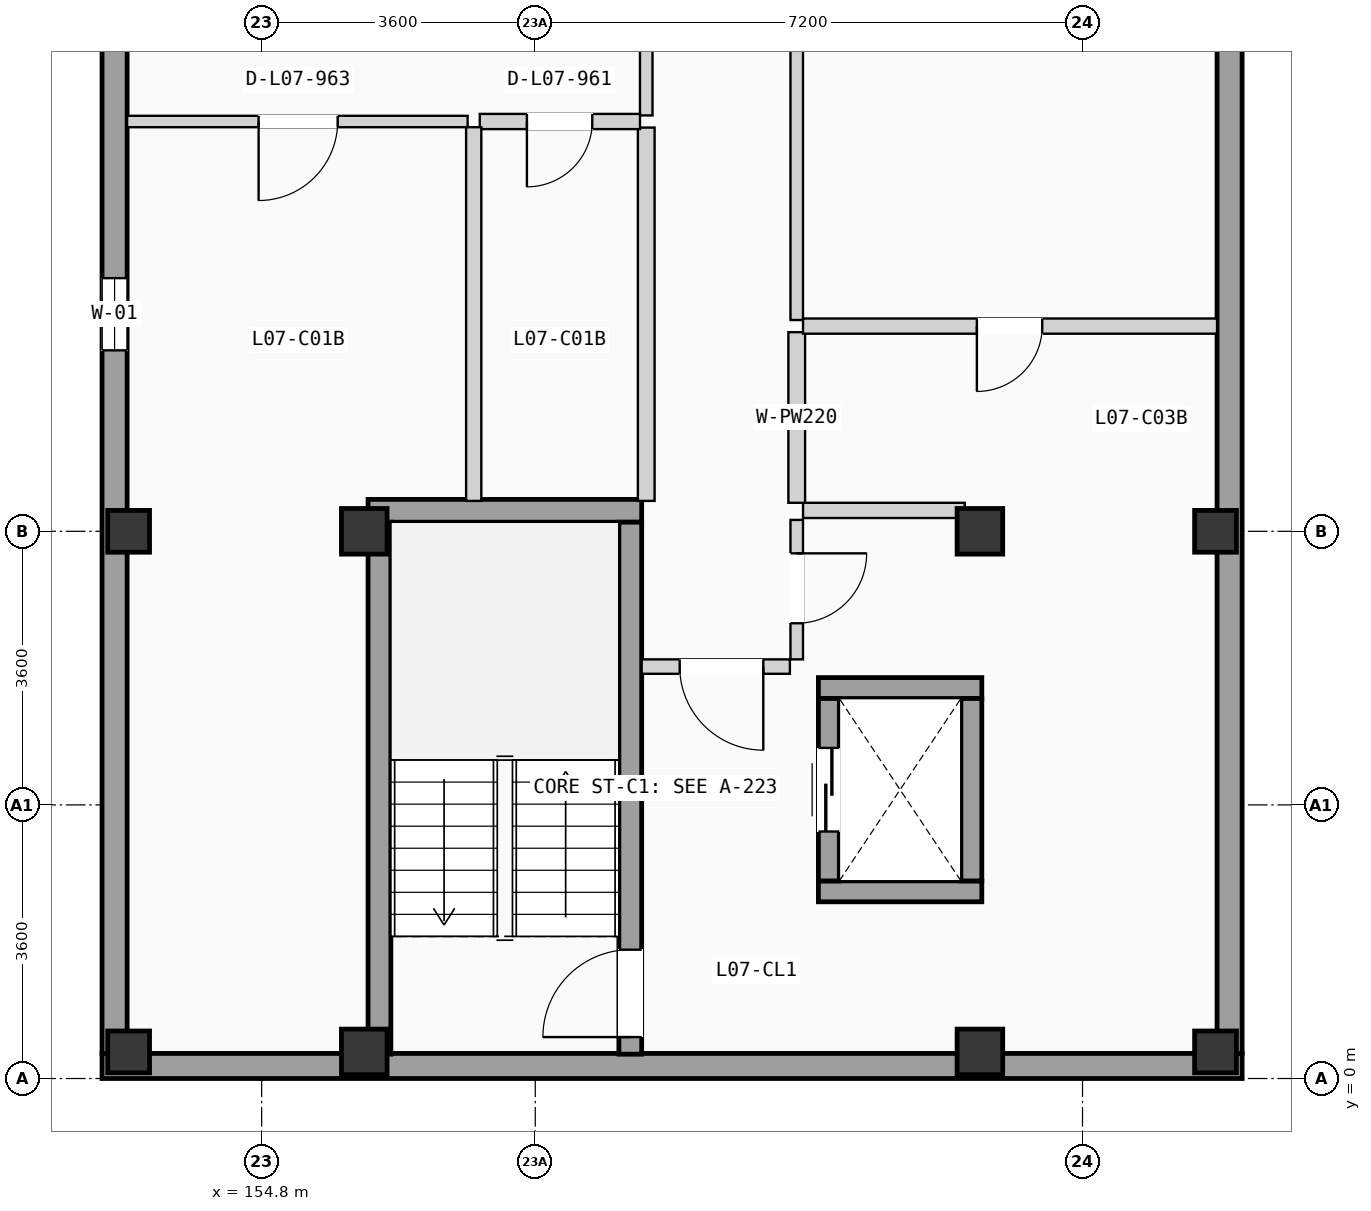
"""IFC4 building model, lengths in metres.
Left out: names, types, materials, properties, quantities, classifications, styles, units other than length and angle.
Written with IfcOpenShell. Run it as: python <this file> out.ifc"""

import sys

from ifc_helpers import new_model, si_unit, direction, frame, frame_2d, origin, origin_2d, place, context, subcontext, project, spatial, rectangle, extrude, element, fill, save


model = new_model("IFC4")
c1 = context("Model", 3, precision=1e-05, world=origin(), true_north=direction((0.0, 1.0)))
c2 = subcontext(c1, "Body", "Model", "MODEL_VIEW")
j1 = project(units=[si_unit("LENGTHUNIT", "METRE"), si_unit("PLANEANGLEUNIT", "RADIAN")], contexts=[c1])
p1 = place(None, origin())
s1 = spatial("IfcSite", under=j1, at=p1, CompositionType="ELEMENT")
p2 = place(p1, origin())
s2 = spatial("IfcBuilding", under=s1, at=p2, CompositionType="ELEMENT")
p3 = place(p2, frame((0.0, 0.0, 24.675)))
s3 = spatial("IfcBuildingStorey", under=s2, at=p3, CompositionType="ELEMENT", Elevation=24.675)
for number, where, z_axis, x_axis in (
    (1, (153.05, 0.35, 0.0), (0.0, 0.0, 1.0), (1.0, 0.0, 0.0)),
    (2, (153.05, 7.2, 0.0), (0.0, 0.0, 1.0), (1.0, 0.0, 0.0)),
):
    element("IfcColumn", number, at=place(p3, frame(where, z_axis=z_axis, x_axis=x_axis)), inside=s3, PredefinedType="COLUMN", context=c2, shape_type="SweptSolid", body=[
        extrude(rectangle(XDim=0.55, YDim=0.55, at=origin_2d()), origin(), (0.0, 0.0, 1.0), 3.15),
    ])
for number, where, z_axis, x_axis in (
    (3, (156.15, 0.35, 0.0), (0.0, 0.0, 1.0), (1.0, 0.0, 0.0)),
    (4, (156.15, 7.2, 0.0), (0.0, 0.0, 1.0), (1.0, 0.0, 0.0)),
    (5, (164.25, 0.35, 0.0), (0.0, 0.0, 1.0), (1.0, 0.0, 0.0)),
    (6, (164.25, 7.2, 0.0), (0.0, 0.0, 1.0), (1.0, 0.0, 0.0)),
):
    element("IfcColumn", number, at=place(p3, frame(where, z_axis=z_axis, x_axis=x_axis)), inside=s3, PredefinedType="COLUMN", context=c2, shape_type="SweptSolid", body=[
        extrude(rectangle(XDim=0.6, YDim=0.6, at=origin_2d()), origin(), (0.0, 0.0, 1.0), 3.15),
    ])
for number, where, z_axis, x_axis in (
    (7, (167.35, 0.35, 0.0), (0.0, 0.0, 1.0), (1.0, 0.0, 0.0)),
    (8, (167.35, 7.2, 0.0), (0.0, 0.0, 1.0), (1.0, 0.0, 0.0)),
):
    element("IfcColumn", number, at=place(p3, frame(where, z_axis=z_axis, x_axis=x_axis)), inside=s3, PredefinedType="COLUMN", context=c2, shape_type="SweptSolid", body=[
        extrude(rectangle(XDim=0.55, YDim=0.55, at=origin_2d()), origin(), (0.0, 0.0, 1.0), 3.15),
    ])
p4 = place(p3, frame((152.7, 0.165, 0.0), z_axis=(0.0, 0.0, 1.0), x_axis=(1.0, 0.0, 0.0)))
e9 = element("IfcWall", 9, at=p4, inside=s3, PredefinedType="SOLIDWALL", context=c2, shape_type="SweptSolid", body=[
    extrude(rectangle(XDim=15.0, YDim=0.33, at=frame_2d((7.5, 0.0))), origin(), (0.0, 0.0, 1.0), 2.9),
])
p5 = place(p3, frame((152.865, 0.33, 0.0), z_axis=(0.0, 0.0, 1.0), x_axis=(0.0, 1.0, 0.0)))
e10 = element("IfcWall", 10, at=p5, inside=s3, PredefinedType="SOLIDWALL", context=c2, shape_type="SweptSolid", body=[
    extrude(rectangle(XDim=49.74, YDim=0.33, at=frame_2d((24.87, 0.0))), origin(), (0.0, 0.0, 1.0), 2.9),
])
p6 = place(p5, frame((15.52, 0.0, 0.565)))
e11 = element("IfcOpeningElement", 11, at=p6, cuts=e10, PredefinedType="OPENING", context=c2, shape_type="SweptSolid", body=[
    extrude(rectangle(XDim=1.6, YDim=1.65, at=frame_2d((0.8, 0.825))), frame((0.0, 0.175, 0.0), z_axis=(0.0, -1.0, 0.0), x_axis=(1.0, 0.0, 0.0)), (0.0, 0.0, 1.0), 0.35),
])
p7 = place(p5, frame((9.251, 0.0, 0.85)))
e12 = element("IfcOpeningElement", 12, at=p7, cuts=e10, PredefinedType="OPENING", context=c2, shape_type="SweptSolid", body=[
    extrude(rectangle(XDim=0.95, YDim=1.2, at=frame_2d((0.475, 0.6))), frame((0.0, 0.175, 0.0), z_axis=(0.0, -1.0, 0.0), x_axis=(1.0, 0.0, 0.0)), (0.0, 0.0, 1.0), 0.35),
])
p8 = place(p5, frame((18.87, 0.0, 0.9)))
e13 = element("IfcOpeningElement", 13, at=p8, cuts=e10, PredefinedType="OPENING", context=c2, shape_type="SweptSolid", body=[
    extrude(rectangle(XDim=1.72, YDim=1.2, at=frame_2d((0.86, 0.6))), frame((0.0, 0.175, 0.0), z_axis=(0.0, -1.0, 0.0), x_axis=(1.0, 0.0, 0.0)), (0.0, 0.0, 1.0), 0.35),
])
p9 = place(p5, frame((31.588, 0.0, 0.865)))
e14 = element("IfcOpeningElement", 14, at=p9, cuts=e10, PredefinedType="OPENING", context=c2, shape_type="SweptSolid", body=[
    extrude(rectangle(XDim=1.72, YDim=1.35, at=frame_2d((0.86, 0.675))), frame((0.0, 0.175, 0.0), z_axis=(0.0, -1.0, 0.0), x_axis=(1.0, 0.0, 0.0)), (0.0, 0.0, 1.0), 0.35),
])
p10 = place(p5, frame((25.016, 0.0, 0.715)))
e15 = element("IfcOpeningElement", 15, at=p10, cuts=e10, PredefinedType="OPENING", context=c2, shape_type="SweptSolid", body=[
    extrude(rectangle(XDim=1.72, YDim=1.5, at=frame_2d((0.86, 0.75))), frame((0.0, 0.175, 0.0), z_axis=(0.0, -1.0, 0.0), x_axis=(1.0, 0.0, 0.0)), (0.0, 0.0, 1.0), 0.35),
])
p11 = place(p5, frame((38.718, 0.0, 0.565)))
e16 = element("IfcOpeningElement", 16, at=p11, cuts=e10, PredefinedType="OPENING", context=c2, shape_type="SweptSolid", body=[
    extrude(rectangle(XDim=1.72, YDim=1.65, at=frame_2d((0.86, 0.825))), frame((0.0, 0.175, 0.0), z_axis=(0.0, -1.0, 0.0), x_axis=(1.0, 0.0, 0.0)), (0.0, 0.0, 1.0), 0.35),
])
p12 = place(p3, frame((167.535, 0.33, 0.0), z_axis=(0.0, 0.0, 1.0), x_axis=(0.0, 1.0, 0.0)))
e17 = element("IfcWall", 17, at=p12, inside=s3, PredefinedType="SOLIDWALL", context=c2, shape_type="SweptSolid", body=[
    extrude(rectangle(XDim=49.74, YDim=0.33, at=frame_2d((24.87, 0.0))), origin(), (0.0, 0.0, 1.0), 2.9),
])
p13 = place(p12, frame((16.416, 0.0, 0.85)))
e18 = element("IfcOpeningElement", 18, at=p13, cuts=e17, PredefinedType="OPENING", context=c2, shape_type="SweptSolid", body=[
    extrude(rectangle(XDim=0.95, YDim=1.2, at=frame_2d((0.475, 0.6))), frame((0.0, 0.175, 0.0), z_axis=(0.0, -1.0, 0.0), x_axis=(1.0, 0.0, 0.0)), (0.0, 0.0, 1.0), 0.35),
])
p14 = place(p12, frame((21.981, 0.0, 0.85)))
e19 = element("IfcOpeningElement", 19, at=p14, cuts=e17, PredefinedType="OPENING", context=c2, shape_type="SweptSolid", body=[
    extrude(rectangle(XDim=0.95, YDim=1.2, at=frame_2d((0.475, 0.6))), frame((0.0, 0.175, 0.0), z_axis=(0.0, -1.0, 0.0), x_axis=(1.0, 0.0, 0.0)), (0.0, 0.0, 1.0), 0.35),
])
p15 = place(p12, frame((31.145, 0.0, 0.865)))
e20 = element("IfcOpeningElement", 20, at=p15, cuts=e17, PredefinedType="OPENING", context=c2, shape_type="SweptSolid", body=[
    extrude(rectangle(XDim=1.85, YDim=1.35, at=frame_2d((0.925, 0.675))), frame((0.0, 0.175, 0.0), z_axis=(0.0, -1.0, 0.0), x_axis=(1.0, 0.0, 0.0)), (0.0, 0.0, 1.0), 0.35),
])
p16 = place(p3, frame((156.2, 7.47, 0.0), z_axis=(0.0, 0.0, 1.0), x_axis=(1.0, 0.0, 0.0)))
e21 = element("IfcWall", 21, at=p16, inside=s3, PredefinedType="SHEAR", context=c2, shape_type="SweptSolid", body=[
    extrude(rectangle(XDim=3.6, YDim=0.3, at=frame_2d((1.8, 0.0))), origin(), (0.0, 0.0, 1.0), 2.9),
])
p17 = place(p3, frame((156.35, 0.32, 0.0), z_axis=(0.0, 0.0, 1.0), x_axis=(0.0, 1.0, 0.0)))
e22 = element("IfcWall", 22, at=p17, inside=s3, PredefinedType="SHEAR", context=c2, shape_type="SweptSolid", body=[
    extrude(rectangle(XDim=7.0, YDim=0.3, at=frame_2d((3.5, 0.0))), origin(), (0.0, 0.0, 1.0), 2.9),
])
p18 = place(p3, frame((159.65, 0.32, 0.0), z_axis=(0.0, 0.0, 1.0), x_axis=(0.0, 1.0, 0.0)))
e23 = element("IfcWall", 23, at=p18, inside=s3, PredefinedType="SHEAR", context=c2, shape_type="SweptSolid", body=[
    extrude(rectangle(XDim=7.0, YDim=0.3, at=frame_2d((3.5, 0.0))), origin(), (0.0, 0.0, 1.0), 2.9),
])
p19 = place(p18, frame((0.225, 0.0, 0.0)))
e24 = element("IfcOpeningElement", 24, at=p19, cuts=e23, PredefinedType="OPENING", context=c2, shape_type="SweptSolid", body=[
    extrude(rectangle(XDim=1.15, YDim=2.12, at=frame_2d((0.575, 1.06))), frame((0.0, 0.16, 0.0), z_axis=(0.0, -1.0, 0.0), x_axis=(1.0, 0.0, 0.0)), (0.0, 0.0, 1.0), 0.32),
])
for number, where, z_axis, x_axis in (
    (25, (162.125, 2.462, 0.0), (0.0, 0.0, 1.0), (1.0, 0.0, 0.0)),
    (26, (162.125, 5.137, 0.0), (0.0, 0.0, 1.0), (1.0, 0.0, 0.0)),
):
    element("IfcWall", number, at=place(p3, frame(where, z_axis=z_axis, x_axis=x_axis)), inside=s3, PredefinedType="SHEAR", context=c2, shape_type="SweptSolid", body=[
        extrude(rectangle(XDim=2.15, YDim=0.275, at=frame_2d((1.075, 0.0))), origin(), (0.0, 0.0, 1.0), 2.9),
    ])
p20 = place(p3, frame((162.262, 2.6, 0.0), z_axis=(0.0, 0.0, 1.0), x_axis=(0.0, 1.0, 0.0)))
e27 = element("IfcWall", 27, at=p20, inside=s3, PredefinedType="SHEAR", context=c2, shape_type="SweptSolid", body=[
    extrude(rectangle(XDim=2.4, YDim=0.275, at=frame_2d((1.2, 0.0))), origin(), (0.0, 0.0, 1.0), 2.9),
])
p21 = place(p20, frame((0.65, 0.0, 0.0)))
e28 = element("IfcOpeningElement", 28, at=p21, cuts=e27, PredefinedType="OPENING", context=c2, shape_type="SweptSolid", body=[
    extrude(rectangle(XDim=1.1, YDim=2.15, at=frame_2d((0.55, 1.075))), frame((0.0, 0.147, 0.0), z_axis=(0.0, -1.0, 0.0), x_axis=(1.0, 0.0, 0.0)), (0.0, 0.0, 1.0), 0.295),
])
p22 = place(p3, frame((164.137, 2.6, 0.0), z_axis=(0.0, 0.0, 1.0), x_axis=(0.0, 1.0, 0.0)))
e29 = element("IfcWall", 29, at=p22, inside=s3, PredefinedType="SHEAR", context=c2, shape_type="SweptSolid", body=[
    extrude(rectangle(XDim=2.4, YDim=0.275, at=frame_2d((1.2, 0.0))), origin(), (0.0, 0.0, 1.0), 2.9),
])
p23 = place(p3, frame((159.8, 5.42, 0.0), z_axis=(0.0, 0.0, 1.0), x_axis=(1.0, 0.0, 0.0)))
e30 = element("IfcWall", 30, at=p23, inside=s3, PredefinedType="PARTITIONING", context=c2, shape_type="SweptSolid", body=[
    extrude(rectangle(XDim=1.95, YDim=0.19, at=frame_2d((0.975, 0.0))), origin(), (0.0, 0.0, 1.0), 2.87),
])
p24 = place(p23, frame((0.5, 0.0, 0.0)))
e31 = element("IfcOpeningElement", 31, at=p24, cuts=e30, PredefinedType="OPENING", context=c2, shape_type="SweptSolid", body=[
    extrude(rectangle(XDim=1.1, YDim=2.12, at=frame_2d((0.55, 1.06))), frame((0.0, 0.105, 0.0), z_axis=(0.0, -1.0, 0.0), x_axis=(1.0, 0.0, 0.0)), (0.0, 0.0, 1.0), 0.21),
])
p25 = place(p3, frame((161.84, 5.515, 0.0), z_axis=(0.0, 0.0, 1.0), x_axis=(0.0, 1.0, 0.0)))
e32 = element("IfcWall", 32, at=p25, inside=s3, PredefinedType="PARTITIONING", context=c2, shape_type="SweptSolid", body=[
    extrude(rectangle(XDim=1.835, YDim=0.165, at=frame_2d((0.917, 0.0))), origin(), (0.0, 0.0, 1.0), 2.87),
])
p26 = place(p25, frame((0.475, 0.0, 0.0)))
e33 = element("IfcOpeningElement", 33, at=p26, cuts=e32, PredefinedType="OPENING", context=c2, shape_type="SweptSolid", body=[
    extrude(rectangle(XDim=0.92, YDim=2.04, at=frame_2d((0.46, 1.02))), frame((0.0, 0.093, 0.0), z_axis=(0.0, -1.0, 0.0), x_axis=(1.0, 0.0, 0.0)), (0.0, 0.0, 1.0), 0.185),
])
p27 = place(p3, frame((161.923, 7.475, 0.0), z_axis=(0.0, 0.0, 1.0), x_axis=(1.0, 0.0, 0.0)))
e34 = element("IfcWall", 34, at=p27, inside=s3, PredefinedType="PLUMBINGWALL", context=c2, shape_type="SweptSolid", body=[
    extrude(rectangle(XDim=2.127, YDim=0.2, at=frame_2d((1.063, 0.0))), origin(), (0.0, 0.0, 1.0), 2.87),
])
p28 = place(p3, frame((159.86, 12.672, 0.0), z_axis=(0.0, 0.0, 1.0), x_axis=(0.0, 1.0, 0.0)))
e35 = element("IfcWall", 35, at=p28, inside=s3, PredefinedType="PARTITIONING", context=c2, shape_type="SweptSolid", body=[
    extrude(rectangle(XDim=5.958, YDim=0.165, at=frame_2d((2.979, 0.0))), origin(), (0.0, 0.0, 1.0), 2.87),
])
p29 = place(p28, frame((2.454, 0.0, 0.0)))
e36 = element("IfcOpeningElement", 36, at=p29, cuts=e35, PredefinedType="OPENING", context=c2, shape_type="SweptSolid", body=[
    extrude(rectangle(XDim=1.05, YDim=2.13, at=frame_2d((0.525, 1.065))), frame((0.0, 0.093, 0.0), z_axis=(0.0, -1.0, 0.0), x_axis=(1.0, 0.0, 0.0)), (0.0, 0.0, 1.0), 0.185),
])
p30 = place(p3, frame((159.86, 7.6, 0.0), z_axis=(0.0, 0.0, 1.0), x_axis=(0.0, 1.0, 0.0)))
e37 = element("IfcWall", 37, at=p30, inside=s3, PredefinedType="PLUMBINGWALL", context=c2, shape_type="SweptSolid", body=[
    extrude(rectangle(XDim=4.912, YDim=0.22, at=frame_2d((2.456, 0.0))), origin(), (0.0, 0.0, 1.0), 2.87),
])
p31 = place(p3, frame((161.84, 7.575, 0.0), z_axis=(0.0, 0.0, 1.0), x_axis=(0.0, 1.0, 0.0)))
e38 = element("IfcWall", 38, at=p31, inside=s3, PredefinedType="PLUMBINGWALL", context=c2, shape_type="SweptSolid", body=[
    extrude(rectangle(XDim=2.245, YDim=0.22, at=frame_2d((1.123, 0.0))), origin(), (0.0, 0.0, 1.0), 2.87),
])
p32 = place(p3, frame((161.84, 9.98, 0.0), z_axis=(0.0, 0.0, 1.0), x_axis=(0.0, 1.0, 0.0)))
e39 = element("IfcWall", 39, at=p32, inside=s3, PredefinedType="PARTITIONING", context=c2, shape_type="SweptSolid", body=[
    extrude(rectangle(XDim=9.792, YDim=0.165, at=frame_2d((4.896, 0.0))), origin(), (0.0, 0.0, 1.0), 2.87),
])
p33 = place(p32, frame((4.371, 0.0, 0.0)))
e40 = element("IfcOpeningElement", 40, at=p33, cuts=e39, PredefinedType="OPENING", context=c2, shape_type="SweptSolid", body=[
    extrude(rectangle(XDim=1.05, YDim=2.13, at=frame_2d((0.525, 1.065))), frame((0.0, 0.093, 0.0), z_axis=(0.0, -1.0, 0.0), x_axis=(1.0, 0.0, 0.0)), (0.0, 0.0, 1.0), 0.185),
])
p34 = place(p3, frame((157.67, 12.592, 0.0), z_axis=(0.0, 0.0, 1.0), x_axis=(1.0, 0.0, 0.0)))
e41 = element("IfcWall", 41, at=p34, inside=s3, PredefinedType="PLUMBINGWALL", context=c2, shape_type="SweptSolid", body=[
    extrude(rectangle(XDim=2.108, YDim=0.2, at=frame_2d((1.054, 0.0))), origin(), (0.0, 0.0, 1.0), 2.87),
])
p35 = place(p34, frame((0.62, 0.0, 0.0)))
e42 = element("IfcOpeningElement", 42, at=p35, cuts=e41, PredefinedType="OPENING", context=c2, shape_type="SweptSolid", body=[
    extrude(rectangle(XDim=0.86, YDim=2.0, at=frame_2d((0.43, 1.0))), frame((0.0, 0.11, 0.0), z_axis=(0.0, -1.0, 0.0), x_axis=(1.0, 0.0, 0.0)), (0.0, 0.0, 1.0), 0.22),
])
p36 = place(p3, frame((153.03, 12.592, 0.0), z_axis=(0.0, 0.0, 1.0), x_axis=(1.0, 0.0, 0.0)))
e43 = element("IfcWall", 43, at=p36, inside=s3, PredefinedType="PARTITIONING", context=c2, shape_type="SweptSolid", body=[
    extrude(rectangle(XDim=4.48, YDim=0.15, at=frame_2d((2.24, 0.0))), origin(), (0.0, 0.0, 1.0), 2.87),
])
p37 = place(p36, frame((1.73, 0.0, 0.0)))
e44 = element("IfcOpeningElement", 44, at=p37, cuts=e43, PredefinedType="OPENING", context=c2, shape_type="SweptSolid", body=[
    extrude(rectangle(XDim=1.04, YDim=2.08, at=frame_2d((0.52, 1.04))), frame((0.0, 0.085, 0.0), z_axis=(0.0, -1.0, 0.0), x_axis=(1.0, 0.0, 0.0)), (0.0, 0.0, 1.0), 0.17),
])
p38 = place(p3, frame((157.59, 7.6, 0.0), z_axis=(0.0, 0.0, 1.0), x_axis=(0.0, 1.0, 0.0)))
e45 = element("IfcWall", 45, at=p38, inside=s3, PredefinedType="PLUMBINGWALL", context=c2, shape_type="SweptSolid", body=[
    extrude(rectangle(XDim=4.917, YDim=0.2, at=frame_2d((2.458, 0.0))), origin(), (0.0, 0.0, 1.0), 2.87),
])
p39 = place(p3, frame((161.923, 9.9, 0.0), z_axis=(0.0, 0.0, 1.0), x_axis=(1.0, 0.0, 0.0)))
e46 = element("IfcWall", 46, at=p39, inside=s3, PredefinedType="PLUMBINGWALL", context=c2, shape_type="SweptSolid", body=[
    extrude(rectangle(XDim=5.447, YDim=0.2, at=frame_2d((2.724, 0.0))), origin(), (0.0, 0.0, 1.0), 2.87),
])
p40 = place(p39, frame((2.287, 0.0, 0.0)))
e47 = element("IfcOpeningElement", 47, at=p40, cuts=e46, PredefinedType="OPENING", context=c2, shape_type="SweptSolid", body=[
    extrude(rectangle(XDim=0.86, YDim=2.0, at=frame_2d((0.43, 1.0))), frame((0.0, 0.11, 0.0), z_axis=(0.0, -1.0, 0.0), x_axis=(1.0, 0.0, 0.0)), (0.0, 0.0, 1.0), 0.22),
])
p41 = place(p7, origin())
e48 = element("IfcWindow", 48, at=p41, inside=s3, PartitioningType="SINGLE_PANEL", PredefinedType="WINDOW", context=c2, shape_type="SweptSolid", body=[
    extrude(rectangle(XDim=0.95, YDim=1.2, at=frame_2d((0.475, 0.6))), frame((0.0, 0.03, 0.0), z_axis=(0.0, -1.0, 0.0), x_axis=(1.0, 0.0, 0.0)), (0.0, 0.0, 1.0), 0.06),
])
fill(e12, e48)
p42 = place(p19, origin())
e49 = element("IfcDoor", 49, at=p42, inside=s3, OperationType="SINGLE_SWING_LEFT", PredefinedType="DOOR", context=c2, shape_type="SweptSolid", body=[
    extrude(rectangle(XDim=1.15, YDim=2.12, at=frame_2d((0.575, 1.06))), frame((0.0, 0.025, 0.0), z_axis=(0.0, -1.0, 0.0), x_axis=(1.0, 0.0, 0.0)), (0.0, 0.0, 1.0), 0.05),
])
fill(e24, e49)
p43 = place(p21, origin())
e50 = element("IfcDoor", 50, at=p43, inside=s3, OperationType="SLIDING_TO_LEFT", PredefinedType="DOOR", context=c2, shape_type="SweptSolid", body=[
    extrude(rectangle(XDim=1.1, YDim=2.15, at=frame_2d((0.55, 1.075))), frame((0.0, 0.025, 0.0), z_axis=(0.0, -1.0, 0.0), x_axis=(1.0, 0.0, 0.0)), (0.0, 0.0, 1.0), 0.05),
])
fill(e28, e50)
p44 = place(p24, frame((1.1, 0.0, 0.0), z_axis=(0.0, 0.0, 1.0), x_axis=(-1.0, 0.0, 0.0)))
e51 = element("IfcDoor", 51, at=p44, inside=s3, OperationType="SINGLE_SWING_RIGHT", PredefinedType="DOOR", context=c2, shape_type="SweptSolid", body=[
    extrude(rectangle(XDim=1.1, YDim=2.12, at=frame_2d((0.55, 1.06))), frame((0.0, 0.025, 0.0), z_axis=(0.0, -1.0, 0.0), x_axis=(1.0, 0.0, 0.0)), (0.0, 0.0, 1.0), 0.05),
])
fill(e31, e51)
p45 = place(p26, frame((0.92, 0.0, 0.0), z_axis=(0.0, 0.0, 1.0), x_axis=(-1.0, 0.0, 0.0)))
e52 = element("IfcDoor", 52, at=p45, inside=s3, OperationType="SINGLE_SWING_RIGHT", PredefinedType="DOOR", context=c2, shape_type="SweptSolid", body=[
    extrude(rectangle(XDim=0.92, YDim=2.04, at=frame_2d((0.46, 1.02))), frame((0.0, 0.025, 0.0), z_axis=(0.0, -1.0, 0.0), x_axis=(1.0, 0.0, 0.0)), (0.0, 0.0, 1.0), 0.05),
])
fill(e33, e52)
p46 = place(p35, frame((0.86, 0.0, 0.0), z_axis=(0.0, 0.0, 1.0), x_axis=(-1.0, 0.0, 0.0)))
e53 = element("IfcDoor", 53, at=p46, inside=s3, OperationType="SINGLE_SWING_LEFT", PredefinedType="DOOR", context=c2, shape_type="SweptSolid", body=[
    extrude(rectangle(XDim=0.86, YDim=2.0, at=frame_2d((0.43, 1.0))), frame((0.0, 0.025, 0.0), z_axis=(0.0, -1.0, 0.0), x_axis=(1.0, 0.0, 0.0)), (0.0, 0.0, 1.0), 0.05),
])
fill(e42, e53)
p47 = place(p37, frame((1.04, 0.0, 0.0), z_axis=(0.0, 0.0, 1.0), x_axis=(-1.0, 0.0, 0.0)))
e54 = element("IfcDoor", 54, at=p47, inside=s3, OperationType="SINGLE_SWING_LEFT", PredefinedType="DOOR", context=c2, shape_type="SweptSolid", body=[
    extrude(rectangle(XDim=1.04, YDim=2.08, at=frame_2d((0.52, 1.04))), frame((0.0, 0.025, 0.0), z_axis=(0.0, -1.0, 0.0), x_axis=(1.0, 0.0, 0.0)), (0.0, 0.0, 1.0), 0.05),
])
fill(e44, e54)
p48 = place(p40, frame((0.86, 0.0, 0.0), z_axis=(0.0, 0.0, 1.0), x_axis=(-1.0, 0.0, 0.0)))
e55 = element("IfcDoor", 55, at=p48, inside=s3, OperationType="SINGLE_SWING_LEFT", PredefinedType="DOOR", context=c2, shape_type="SweptSolid", body=[
    extrude(rectangle(XDim=0.86, YDim=2.0, at=frame_2d((0.43, 1.0))), frame((0.0, 0.025, 0.0), z_axis=(0.0, -1.0, 0.0), x_axis=(1.0, 0.0, 0.0)), (0.0, 0.0, 1.0), 0.05),
])
fill(e47, e55)
save(model, sys.argv[1])
